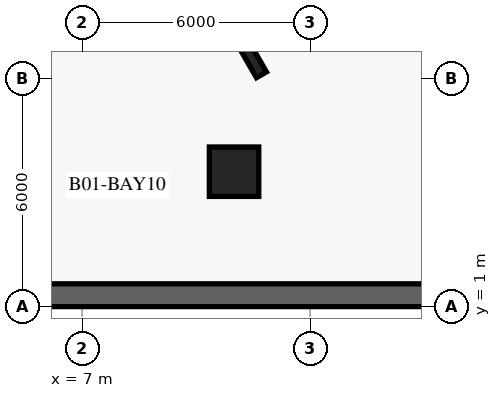
"""IFC4 building model, lengths in metres.
Left out: names, types, materials, properties, quantities, classifications, styles, units other than length and angle.
Written with IfcOpenShell. Run it as: python <this file> out.ifc"""

import sys

from ifc_helpers import new_model, si_unit, direction, frame, frame_2d, origin, origin_2d, place, context, subcontext, project, spatial, rectangle, i_section, extrude, element, save


model = new_model("IFC4")
c1 = context("Model", 3, precision=1e-05, world=origin(), true_north=direction((0.0, 1.0)))
c2 = subcontext(c1, "Body", "Model", "MODEL_VIEW")
j1 = project(units=[si_unit("LENGTHUNIT", "METRE"), si_unit("PLANEANGLEUNIT", "RADIAN")], contexts=[c1])
p1 = place(None, origin())
s1 = spatial("IfcSite", under=j1, at=p1, CompositionType="ELEMENT")
p2 = place(p1, origin())
s2 = spatial("IfcBuilding", under=s1, at=p2, CompositionType="ELEMENT")
p3 = place(p2, frame((0.0, 0.0, -4.2)))
s3 = spatial("IfcBuildingStorey", under=s2, at=p3, CompositionType="ELEMENT", Elevation=-4.2)
p4 = place(p3, frame((1.0, 1.3, 0.0), z_axis=(0.0, 0.0, 1.0), x_axis=(1.0, 0.0, 0.0)))
e1 = element("IfcWall", 1, at=p4, inside=s3, PredefinedType="USERDEFINED", context=c2, shape_type="SweptSolid", body=[
    extrude(rectangle(XDim=74.0, YDim=0.6, at=frame_2d((37.0, 0.0))), origin(), (0.0, 0.0, 1.0), 3.88),
])
p5 = place(p3, frame((11.469, 7.536, 0.0), z_axis=(0.0, 0.0, 1.0), x_axis=(-0.5, 0.866025403784, 0.0)))
e2 = element("IfcColumn", 2, at=p5, inside=s3, PredefinedType="COLUMN", context=c2, shape_type="SweptSolid", body=[
    extrude(i_section(OverallWidth=0.302, OverallDepth=1.008, WebThickness=0.021, FlangeThickness=0.04, at=origin_2d()), origin(), (0.0, 0.0, 1.0), 4.2),
])
p6 = place(p3, frame((11.0, 4.55, 0.0), z_axis=(0.0, 0.0, 1.0), x_axis=(1.0, 0.0, 0.0)))
e3 = element("IfcColumn", 3, at=p6, inside=s3, PredefinedType="COLUMN", context=c2, shape_type="SweptSolid", body=[
    extrude(rectangle(XDim=1.3, YDim=1.3, at=origin_2d()), origin(), (0.0, 0.0, 1.0), 4.2),
])
save(model, sys.argv[1])
